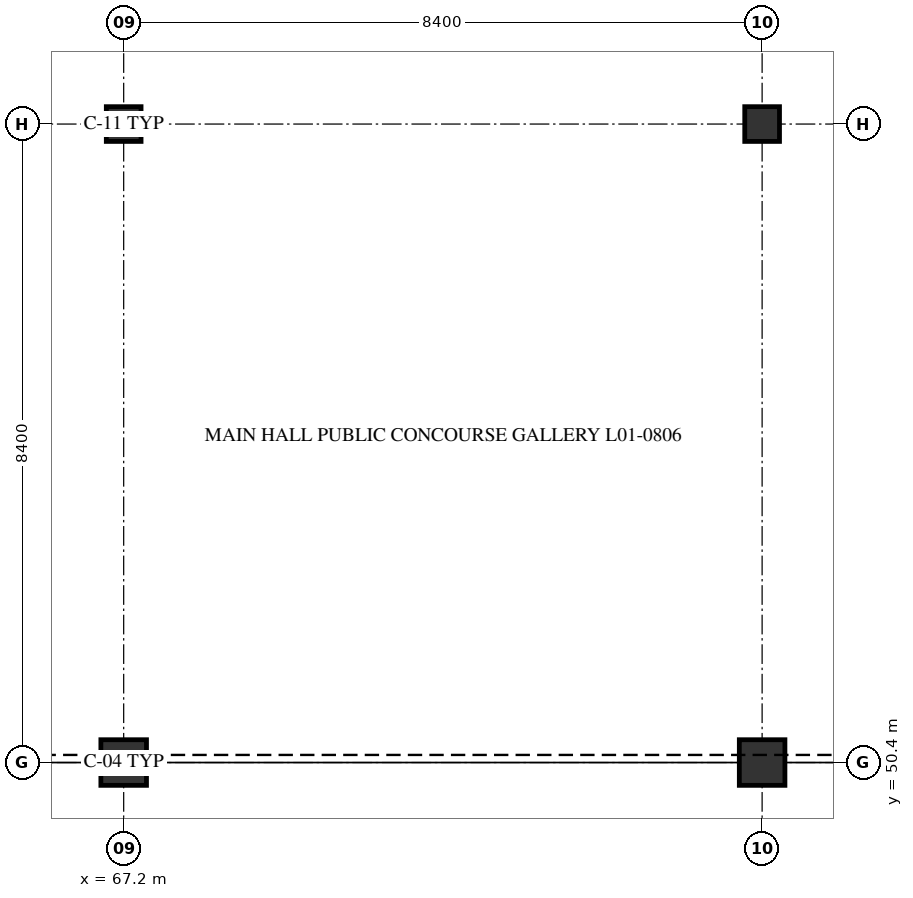
"""IFC4 building model, lengths in metres.
Left out: names, types, materials, properties, quantities, classifications, styles, units other than length and angle.
Written with IfcOpenShell. Run it as: python <this file> out.ifc"""

import sys

from ifc_helpers import new_model, si_unit, direction, frame, origin, origin_2d, place, context, subcontext, project, spatial, rectangle, hollow_circle, extrude, element, save


model = new_model("IFC4")
c1 = context("Model", 3, precision=1e-05, world=origin(), true_north=direction((0.0, 1.0)))
c2 = subcontext(c1, "Body", "Model", "MODEL_VIEW")
j1 = project(units=[si_unit("LENGTHUNIT", "METRE"), si_unit("PLANEANGLEUNIT", "RADIAN")], contexts=[c1])
p1 = place(None, origin())
s1 = spatial("IfcSite", under=j1, at=p1, CompositionType="ELEMENT")
p2 = place(p1, origin())
s2 = spatial("IfcBuilding", under=s1, at=p2, CompositionType="ELEMENT")
p3 = place(p2, frame((0.0, 0.0, 4.8)))
s3 = spatial("IfcBuildingStorey", under=s2, at=p3, CompositionType="ELEMENT", Elevation=4.8)
p4 = place(p3, frame((67.2, 50.4, 0.0), z_axis=(0.0, 0.0, 1.0), x_axis=(1.0, 0.0, 0.0)))
e1 = element("IfcColumn", 1, at=p4, inside=s3, PredefinedType="COLUMN", context=c2, shape_type="SweptSolid", body=[
    extrude(rectangle(XDim=0.6, YDim=0.6, at=origin_2d()), origin(), (0.0, 0.0, 1.0), 4.5),
])
p5 = place(p3, frame((67.2, 58.8, 0.0), z_axis=(0.0, 0.0, 1.0), x_axis=(1.0, 0.0, 0.0)))
e2 = element("IfcColumn", 2, at=p5, inside=s3, PredefinedType="COLUMN", context=c2, shape_type="SweptSolid", body=[
    extrude(hollow_circle(Radius=0.229, WallThickness=0.02, at=origin_2d()), origin(), (0.0, 0.0, 1.0), 4.5),
])
p6 = place(p3, frame((75.6, 50.4, 0.0), z_axis=(0.0, 0.0, 1.0), x_axis=(1.0, 0.0, 0.0)))
e3 = element("IfcColumn", 3, at=p6, inside=s3, PredefinedType="COLUMN", context=c2, shape_type="SweptSolid", body=[
    extrude(rectangle(XDim=0.6, YDim=0.6, at=origin_2d()), origin(), (0.0, 0.0, 1.0), 4.5),
])
p7 = place(p3, frame((75.6, 58.8, 0.0), z_axis=(0.0, 0.0, 1.0), x_axis=(1.0, 0.0, 0.0)))
e4 = element("IfcColumn", 4, at=p7, inside=s3, PredefinedType="COLUMN", context=c2, shape_type="SweptSolid", body=[
    extrude(hollow_circle(Radius=0.229, WallThickness=0.02, at=origin_2d()), origin(), (0.0, 0.0, 1.0), 4.5),
])
save(model, sys.argv[1])
